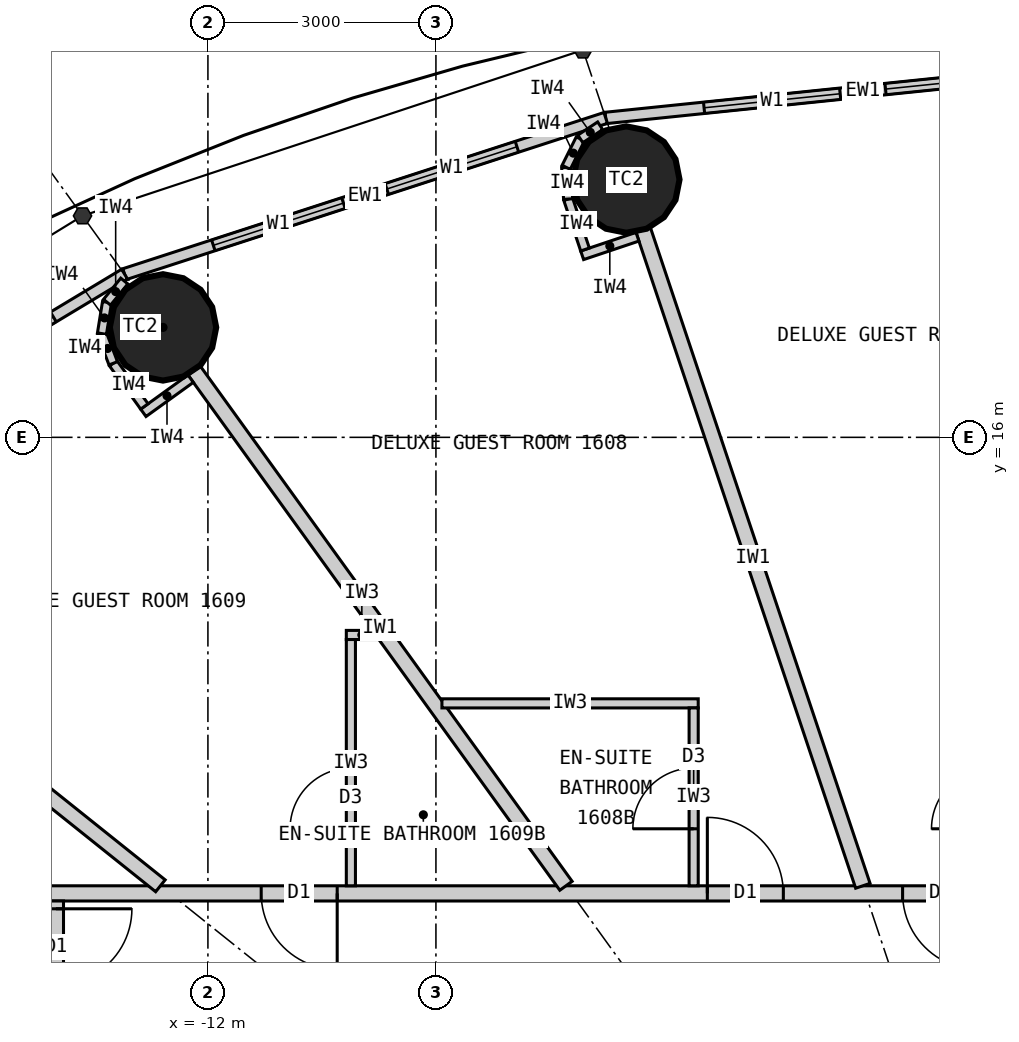
"""IFC4 building model, lengths in metres.
Left out: names, types, materials, properties, quantities, classifications, styles, units other than length and angle.
Written with IfcOpenShell. Run it as: python <this file> out.ifc"""

import sys

from ifc_helpers import new_model, si_unit, direction, frame, frame_2d, origin, origin_2d, place, context, subcontext, project, spatial, rectangle, circle, extrude, element, fill, save


model = new_model("IFC4")
c1 = context("Model", 3, precision=1e-05, world=origin(), true_north=direction((0.0, 1.0)))
c2 = subcontext(c1, "Body", "Model", "MODEL_VIEW")
j1 = project(units=[si_unit("LENGTHUNIT", "METRE"), si_unit("PLANEANGLEUNIT", "RADIAN")], contexts=[c1])
p1 = place(None, origin())
s1 = spatial("IfcSite", under=j1, at=p1, CompositionType="ELEMENT")
p2 = place(p1, origin())
s2 = spatial("IfcBuilding", under=s1, at=p2, CompositionType="ELEMENT")
p3 = place(p2, frame((0.0, 0.0, 67.2)))
s3 = spatial("IfcBuildingStorey", under=s2, at=p3, CompositionType="ELEMENT", Elevation=67.2)
for number, where, z_axis, x_axis in (
    (1, (-6.495, 19.391, 0.0), (0.0, 0.0, 1.0), (1.0, 0.0, 0.0)),
    (2, (-12.591, 17.447, 0.0), (0.0, 0.0, 1.0), (1.0, 0.0, 0.0)),
):
    element("IfcColumn", number, at=place(p3, frame(where, z_axis=z_axis, x_axis=x_axis)), inside=s3, PredefinedType="COLUMN", context=c2, shape_type="SweptSolid", body=[
        extrude(circle(Radius=0.7, at=origin_2d()), origin(), (0.0, 0.0, 1.0), 3.3),
    ])
p4 = place(p3, frame((0.0, 20.9, 0.0), z_axis=(0.0, 0.0, 1.0), x_axis=(-0.994721394369, -0.102612609291, 0.0)))
e3 = element("IfcWall", 3, at=p4, inside=s3, PredefinedType="ELEMENTEDWALL", context=c2, shape_type="SweptSolid", body=[
    extrude(rectangle(XDim=6.802, YDim=0.15, at=frame_2d((3.401, 0.0))), origin(), (0.0, 0.0, 1.0), 3.12),
])
p5 = place(p4, frame((1.301, 0.0, 0.9)))
e4 = element("IfcOpeningElement", 4, at=p5, cuts=e3, PredefinedType="OPENING", context=c2, shape_type="SweptSolid", body=[
    extrude(rectangle(XDim=1.8, YDim=1.9, at=frame_2d((0.9, 0.95))), frame((0.0, 0.085, 0.0), z_axis=(0.0, -1.0, 0.0), x_axis=(1.0, 0.0, 0.0)), (0.0, 0.0, 1.0), 0.17),
])
p6 = place(p4, frame((3.701, 0.0, 0.9)))
e5 = element("IfcOpeningElement", 5, at=p6, cuts=e3, PredefinedType="OPENING", context=c2, shape_type="SweptSolid", body=[
    extrude(rectangle(XDim=1.8, YDim=1.9, at=frame_2d((0.9, 0.95))), frame((0.0, 0.085, 0.0), z_axis=(0.0, -1.0, 0.0), x_axis=(1.0, 0.0, 0.0)), (0.0, 0.0, 1.0), 0.17),
])
p7 = place(p3, frame((-6.766, 20.202, 0.0), z_axis=(0.0, 0.0, 1.0), x_axis=(-0.951137534625, -0.308767534285, 0.0)))
e6 = element("IfcWall", 6, at=p7, inside=s3, PredefinedType="ELEMENTEDWALL", context=c2, shape_type="SweptSolid", body=[
    extrude(rectangle(XDim=6.655, YDim=0.15, at=frame_2d((3.328, 0.0))), origin(), (0.0, 0.0, 1.0), 3.12),
])
p8 = place(p7, frame((1.228, 0.0, 0.9)))
e7 = element("IfcOpeningElement", 7, at=p8, cuts=e6, PredefinedType="OPENING", context=c2, shape_type="SweptSolid", body=[
    extrude(rectangle(XDim=1.8, YDim=1.9, at=frame_2d((0.9, 0.95))), frame((0.0, 0.085, 0.0), z_axis=(0.0, -1.0, 0.0), x_axis=(1.0, 0.0, 0.0)), (0.0, 0.0, 1.0), 0.17),
])
p9 = place(p7, frame((3.628, 0.0, 0.9)))
e8 = element("IfcOpeningElement", 8, at=p9, cuts=e6, PredefinedType="OPENING", context=c2, shape_type="SweptSolid", body=[
    extrude(rectangle(XDim=1.8, YDim=1.9, at=frame_2d((0.9, 0.95))), frame((0.0, 0.085, 0.0), z_axis=(0.0, -1.0, 0.0), x_axis=(1.0, 0.0, 0.0)), (0.0, 0.0, 1.0), 0.17),
])
p10 = place(p3, frame((-13.096, 18.147, 0.0), z_axis=(0.0, 0.0, 1.0), x_axis=(-0.856983180864, -0.515344377787, 0.0)))
e9 = element("IfcWall", 9, at=p10, inside=s3, PredefinedType="ELEMENTEDWALL", context=c2, shape_type="SweptSolid", body=[
    extrude(rectangle(XDim=6.386, YDim=0.15, at=frame_2d((3.193, 0.0))), origin(), (0.0, 0.0, 1.0), 3.12),
])
p11 = place(p10, frame((1.093, 0.0, 0.9)))
e10 = element("IfcOpeningElement", 10, at=p11, cuts=e9, PredefinedType="OPENING", context=c2, shape_type="SweptSolid", body=[
    extrude(rectangle(XDim=1.8, YDim=1.9, at=frame_2d((0.9, 0.95))), frame((0.0, 0.085, 0.0), z_axis=(0.0, -1.0, 0.0), x_axis=(1.0, 0.0, 0.0)), (0.0, 0.0, 1.0), 0.17),
])
p12 = place(p10, frame((3.493, 0.0, 0.9)))
e11 = element("IfcOpeningElement", 11, at=p12, cuts=e9, PredefinedType="OPENING", context=c2, shape_type="SweptSolid", body=[
    extrude(rectangle(XDim=1.8, YDim=1.9, at=frame_2d((0.9, 0.95))), frame((0.0, 0.085, 0.0), z_axis=(0.0, -1.0, 0.0), x_axis=(1.0, 0.0, 0.0)), (0.0, 0.0, 1.0), 0.17),
])
p13 = place(p3, frame((-14.1, 10.0, 0.0), z_axis=(0.0, 0.0, 1.0), x_axis=(1.0, 0.0, 0.0)))
e12 = element("IfcWall", 12, at=p13, inside=s3, PredefinedType="PARTITIONING", context=c2, shape_type="SweptSolid", body=[
    extrude(rectangle(XDim=28.2, YDim=0.2, at=frame_2d((14.1, 0.0))), origin(), (0.0, 0.0, 1.0), 3.12),
])
p14 = place(p13, frame((18.529, 0.0, 0.0)))
e13 = element("IfcOpeningElement", 13, at=p14, cuts=e12, PredefinedType="OPENING", context=c2, shape_type="SweptSolid", body=[
    extrude(rectangle(XDim=1.0, YDim=2.2, at=frame_2d((0.5, 1.1))), frame((0.0, 0.11, 0.0), z_axis=(0.0, -1.0, 0.0), x_axis=(1.0, 0.0, 0.0)), (0.0, 0.0, 1.0), 0.22),
])
p15 = place(p13, frame((14.623, 0.0, 0.0)))
e14 = element("IfcOpeningElement", 14, at=p15, cuts=e12, PredefinedType="OPENING", context=c2, shape_type="SweptSolid", body=[
    extrude(rectangle(XDim=1.0, YDim=2.2, at=frame_2d((0.5, 1.1))), frame((0.0, 0.11, 0.0), z_axis=(0.0, -1.0, 0.0), x_axis=(1.0, 0.0, 0.0)), (0.0, 0.0, 1.0), 0.22),
])
p16 = place(p13, frame((11.24, 0.0, 0.0)))
e15 = element("IfcOpeningElement", 15, at=p16, cuts=e12, PredefinedType="OPENING", context=c2, shape_type="SweptSolid", body=[
    extrude(rectangle(XDim=1.0, YDim=2.2, at=frame_2d((0.5, 1.1))), frame((0.0, 0.11, 0.0), z_axis=(0.0, -1.0, 0.0), x_axis=(1.0, 0.0, 0.0)), (0.0, 0.0, 1.0), 0.22),
])
p17 = place(p13, frame((8.671, 0.0, 0.0)))
e16 = element("IfcOpeningElement", 16, at=p17, cuts=e12, PredefinedType="OPENING", context=c2, shape_type="SweptSolid", body=[
    extrude(rectangle(XDim=1.0, YDim=2.2, at=frame_2d((0.5, 1.1))), frame((0.0, 0.11, 0.0), z_axis=(0.0, -1.0, 0.0), x_axis=(1.0, 0.0, 0.0)), (0.0, 0.0, 1.0), 0.22),
])
p18 = place(p13, frame((2.801, 0.0, 0.0)))
e17 = element("IfcOpeningElement", 17, at=p18, cuts=e12, PredefinedType="OPENING", context=c2, shape_type="SweptSolid", body=[
    extrude(rectangle(XDim=1.0, YDim=2.2, at=frame_2d((0.5, 1.1))), frame((0.0, 0.11, 0.0), z_axis=(0.0, -1.0, 0.0), x_axis=(1.0, 0.0, 0.0)), (0.0, 0.0, 1.0), 0.22),
])
p19 = place(p3, frame((-14.0, 9.9, 0.0), z_axis=(0.0, 0.0, 1.0), x_axis=(0.0, -1.0, 0.0)))
e18 = element("IfcWall", 18, at=p19, inside=s3, PredefinedType="PARTITIONING", context=c2, shape_type="SweptSolid", body=[
    extrude(rectangle(XDim=19.8, YDim=0.2, at=frame_2d((9.9, 0.0))), origin(), (0.0, 0.0, 1.0), 3.12),
])
p20 = place(p19, frame((0.103, 0.0, 0.0)))
e19 = element("IfcOpeningElement", 19, at=p20, cuts=e18, PredefinedType="OPENING", context=c2, shape_type="SweptSolid", body=[
    extrude(rectangle(XDim=1.0, YDim=2.2, at=frame_2d((0.5, 1.1))), frame((0.0, 0.11, 0.0), z_axis=(0.0, -1.0, 0.0), x_axis=(1.0, 0.0, 0.0)), (0.0, 0.0, 1.0), 0.22),
])
p21 = place(p19, frame((5.248, 0.0, 0.0)))
e20 = element("IfcOpeningElement", 20, at=p21, cuts=e18, PredefinedType="OPENING", context=c2, shape_type="SweptSolid", body=[
    extrude(rectangle(XDim=1.0, YDim=2.2, at=frame_2d((0.5, 1.1))), frame((0.0, 0.11, 0.0), z_axis=(0.0, -1.0, 0.0), x_axis=(1.0, 0.0, 0.0)), (0.0, 0.0, 1.0), 0.22),
])
p22 = place(p19, frame((9.438, 0.0, 0.0)))
e21 = element("IfcOpeningElement", 21, at=p22, cuts=e18, PredefinedType="OPENING", context=c2, shape_type="SweptSolid", body=[
    extrude(rectangle(XDim=1.0, YDim=2.2, at=frame_2d((0.5, 1.1))), frame((0.0, 0.11, 0.0), z_axis=(0.0, -1.0, 0.0), x_axis=(1.0, 0.0, 0.0)), (0.0, 0.0, 1.0), 0.22),
])
p23 = place(p19, frame((13.942, 0.0, 0.0)))
e22 = element("IfcOpeningElement", 22, at=p23, cuts=e18, PredefinedType="OPENING", context=c2, shape_type="SweptSolid", body=[
    extrude(rectangle(XDim=1.0, YDim=2.2, at=frame_2d((0.5, 1.1))), frame((0.0, 0.11, 0.0), z_axis=(0.0, -1.0, 0.0), x_axis=(1.0, 0.0, 0.0)), (0.0, 0.0, 1.0), 0.22),
])
p24 = place(p19, frame((18.698, 0.0, 0.0)))
e23 = element("IfcOpeningElement", 23, at=p24, cuts=e18, PredefinedType="OPENING", context=c2, shape_type="SweptSolid", body=[
    extrude(rectangle(XDim=1.0, YDim=2.2, at=frame_2d((0.5, 1.1))), frame((0.0, 0.11, 0.0), z_axis=(0.0, -1.0, 0.0), x_axis=(1.0, 0.0, 0.0)), (0.0, 0.0, 1.0), 0.22),
])
p25 = place(p3, frame((-3.383, 10.1, 0.0), z_axis=(0.0, 0.0, 1.0), x_axis=(-0.31759592231, 0.948226149256, 0.0)))
e24 = element("IfcWall", 24, at=p25, inside=s3, PredefinedType="PARTITIONING", context=c2, shape_type="SweptSolid", body=[
    extrude(rectangle(XDim=9.098, YDim=0.2, at=frame_2d((4.549, 0.0))), origin(), (0.0, 0.0, 1.0), 2.32),
])
p26 = place(p3, frame((-7.289, 10.1, 0.0), z_axis=(0.0, 0.0, 1.0), x_axis=(-0.585198353053, 0.810890182197, 0.0)))
e25 = element("IfcWall", 25, at=p26, inside=s3, PredefinedType="PARTITIONING", context=c2, shape_type="SweptSolid", body=[
    extrude(rectangle(XDim=8.36, YDim=0.2, at=frame_2d((4.18, 0.0))), origin(), (0.0, 0.0, 1.0), 2.32),
])
p27 = place(p3, frame((-12.625, 10.1, 0.0), z_axis=(0.0, 0.0, 1.0), x_axis=(-0.780892451574, 0.624665493744, 0.0)))
e26 = element("IfcWall", 26, at=p27, inside=s3, PredefinedType="PARTITIONING", context=c2, shape_type="SweptSolid", body=[
    extrude(rectangle(XDim=6.045, YDim=0.2, at=frame_2d((3.022, 0.0))), origin(), (0.0, 0.0, 1.0), 2.32),
])
p28 = place(p3, frame((-8.921, 12.5, 0.0), z_axis=(0.0, 0.0, 1.0), x_axis=(1.0, 0.0, 0.0)))
e27 = element("IfcWall", 27, at=p28, inside=s3, PredefinedType="PARTITIONING", context=c2, shape_type="SweptSolid", body=[
    extrude(rectangle(XDim=3.372, YDim=0.12, at=frame_2d((1.686, 0.0))), origin(), (0.0, 0.0, 1.0), 3.12),
])
p29 = place(p3, frame((-5.609, 10.1, 0.0), z_axis=(0.0, 0.0, 1.0), x_axis=(0.0, 1.0, 0.0)))
e28 = element("IfcWall", 28, at=p29, inside=s3, PredefinedType="PARTITIONING", context=c2, shape_type="SweptSolid", body=[
    extrude(rectangle(XDim=2.34, YDim=0.12, at=frame_2d((1.17, 0.0))), origin(), (0.0, 0.0, 1.0), 3.12),
])
p30 = place(p29, frame((0.75, 0.0, 0.0)))
e29 = element("IfcOpeningElement", 29, at=p30, cuts=e28, PredefinedType="OPENING", context=c2, shape_type="SweptSolid", body=[
    extrude(rectangle(XDim=0.8, YDim=2.1, at=frame_2d((0.4, 1.05))), frame((0.0, 0.07, 0.0), z_axis=(0.0, -1.0, 0.0), x_axis=(1.0, 0.0, 0.0)), (0.0, 0.0, 1.0), 0.14),
])
p31 = place(p3, frame((-9.771, 13.4, 0.0), z_axis=(0.0, 0.0, 1.0), x_axis=(-1.0, 0.0, 0.0)))
e30 = element("IfcWall", 30, at=p31, inside=s3, PredefinedType="PARTITIONING", context=c2, shape_type="SweptSolid", body=[
    extrude(rectangle(XDim=0.408, YDim=0.12, at=frame_2d((0.204, 0.0))), origin(), (0.0, 0.0, 1.0), 3.12),
])
p32 = place(p3, frame((-10.119, 10.1, 0.0), z_axis=(0.0, 0.0, 1.0), x_axis=(0.0, 1.0, 0.0)))
e31 = element("IfcWall", 31, at=p32, inside=s3, PredefinedType="PARTITIONING", context=c2, shape_type="SweptSolid", body=[
    extrude(rectangle(XDim=3.24, YDim=0.12, at=frame_2d((1.62, 0.0))), origin(), (0.0, 0.0, 1.0), 3.12),
])
p33 = place(p32, frame((0.75, 0.0, 0.0)))
e32 = element("IfcOpeningElement", 32, at=p33, cuts=e31, PredefinedType="OPENING", context=c2, shape_type="SweptSolid", body=[
    extrude(rectangle(XDim=0.8, YDim=2.1, at=frame_2d((0.4, 1.05))), frame((0.0, 0.07, 0.0), z_axis=(0.0, -1.0, 0.0), x_axis=(1.0, 0.0, 0.0)), (0.0, 0.0, 1.0), 0.14),
])
p34 = place(p3, frame((-6.348, 18.639, 0.0), z_axis=(0.0, 0.0, 1.0), x_axis=(-0.948268951266, -0.317468102437, 0.0)))
e33 = element("IfcWall", 33, at=p34, inside=s3, PredefinedType="PARTITIONING", context=c2, shape_type="SweptSolid", body=[
    extrude(rectangle(XDim=0.768, YDim=0.12, at=frame_2d((0.384, 0.0))), origin(), (0.0, 0.0, 1.0), 3.12),
])
p35 = place(p3, frame((-7.038, 18.471, 0.0), z_axis=(0.0, 0.0, 1.0), x_axis=(-0.317378466199, 0.9482989556, 0.0)))
e34 = element("IfcWall", 34, at=p35, inside=s3, PredefinedType="PARTITIONING", context=c2, shape_type="SweptSolid", body=[
    extrude(rectangle(XDim=0.7, YDim=0.12, at=frame_2d((0.35, 0.0))), origin(), (0.0, 0.0, 1.0), 3.12),
])
p36 = place(p3, frame((-7.26, 19.135, 0.0), z_axis=(0.0, 0.0, 1.0), x_axis=(-0.0613238046, 0.99811792439, 0.0)))
e35 = element("IfcWall", 35, at=p36, inside=s3, PredefinedType="PARTITIONING", context=c2, shape_type="SweptSolid", body=[
    extrude(rectangle(XDim=0.418, YDim=0.12, at=frame_2d((0.209, 0.0))), origin(), (0.0, 0.0, 1.0), 3.12),
])
p37 = place(p3, frame((-7.286, 19.552, 0.0), z_axis=(0.0, 0.0, 1.0), x_axis=(0.445810757773, 0.89512723579, 0.0)))
e36 = element("IfcWall", 36, at=p37, inside=s3, PredefinedType="PARTITIONING", context=c2, shape_type="SweptSolid", body=[
    extrude(rectangle(XDim=0.418, YDim=0.12, at=frame_2d((0.209, 0.0))), origin(), (0.0, 0.0, 1.0), 3.12),
])
p38 = place(p3, frame((-7.1, 19.926, 0.0), z_axis=(0.0, 0.0, 1.0), x_axis=(0.833488262509, 0.552537162787, 0.0)))
e37 = element("IfcWall", 37, at=p38, inside=s3, PredefinedType="PARTITIONING", context=c2, shape_type="SweptSolid", body=[
    extrude(rectangle(XDim=0.313, YDim=0.12, at=frame_2d((0.156, 0.0))), origin(), (0.0, 0.0, 1.0), 3.12),
])
p39 = place(p3, frame((-12.227, 16.772, 0.0), z_axis=(0.0, 0.0, 1.0), x_axis=(-0.810821798253, -0.585293098778, 0.0)))
e38 = element("IfcWall", 38, at=p39, inside=s3, PredefinedType="PARTITIONING", context=c2, shape_type="SweptSolid", body=[
    extrude(rectangle(XDim=0.768, YDim=0.12, at=frame_2d((0.384, 0.0))), origin(), (0.0, 0.0, 1.0), 3.12),
])
p40 = place(p3, frame((-12.836, 16.406, 0.0), z_axis=(0.0, 0.0, 1.0), x_axis=(-0.585223113993, 0.810872312296, 0.0)))
e39 = element("IfcWall", 39, at=p40, inside=s3, PredefinedType="PARTITIONING", context=c2, shape_type="SweptSolid", body=[
    extrude(rectangle(XDim=0.7, YDim=0.12, at=frame_2d((0.35, 0.0))), origin(), (0.0, 0.0, 1.0), 3.12),
])
p41 = place(p3, frame((-13.246, 16.974, 0.0), z_axis=(0.0, 0.0, 1.0), x_axis=(-0.355728122235, 0.934589483705, 0.0)))
e40 = element("IfcWall", 40, at=p41, inside=s3, PredefinedType="PARTITIONING", context=c2, shape_type="SweptSolid", body=[
    extrude(rectangle(XDim=0.418, YDim=0.12, at=frame_2d((0.209, 0.0))), origin(), (0.0, 0.0, 1.0), 3.12),
])
p42 = place(p3, frame((-13.394, 17.365, 0.0), z_axis=(0.0, 0.0, 1.0), x_axis=(0.159379276926, 0.987217425943, 0.0)))
e41 = element("IfcWall", 41, at=p42, inside=s3, PredefinedType="PARTITIONING", context=c2, shape_type="SweptSolid", body=[
    extrude(rectangle(XDim=0.418, YDim=0.12, at=frame_2d((0.209, 0.0))), origin(), (0.0, 0.0, 1.0), 3.12),
])
p43 = place(p3, frame((-13.328, 17.777, 0.0), z_axis=(0.0, 0.0, 1.0), x_axis=(0.632276783541, 0.774742582407, 0.0)))
e42 = element("IfcWall", 42, at=p43, inside=s3, PredefinedType="PARTITIONING", context=c2, shape_type="SweptSolid", body=[
    extrude(rectangle(XDim=0.36, YDim=0.12, at=frame_2d((0.18, 0.0))), origin(), (0.0, 0.0, 1.0), 3.12),
])
p44 = place(p5, origin())
e43 = element("IfcWindow", 43, at=p44, inside=s3, PartitioningType="SINGLE_PANEL", PredefinedType="WINDOW", context=c2, shape_type="SweptSolid", body=[
    extrude(rectangle(XDim=1.8, YDim=1.9, at=frame_2d((0.9, 0.95))), frame((0.0, 0.03, 0.0), z_axis=(0.0, -1.0, 0.0), x_axis=(1.0, 0.0, 0.0)), (0.0, 0.0, 1.0), 0.06),
])
fill(e4, e43)
p45 = place(p6, origin())
e44 = element("IfcWindow", 44, at=p45, inside=s3, PartitioningType="SINGLE_PANEL", PredefinedType="WINDOW", context=c2, shape_type="SweptSolid", body=[
    extrude(rectangle(XDim=1.8, YDim=1.9, at=frame_2d((0.9, 0.95))), frame((0.0, 0.03, 0.0), z_axis=(0.0, -1.0, 0.0), x_axis=(1.0, 0.0, 0.0)), (0.0, 0.0, 1.0), 0.06),
])
fill(e5, e44)
p46 = place(p8, origin())
e45 = element("IfcWindow", 45, at=p46, inside=s3, PartitioningType="SINGLE_PANEL", PredefinedType="WINDOW", context=c2, shape_type="SweptSolid", body=[
    extrude(rectangle(XDim=1.8, YDim=1.9, at=frame_2d((0.9, 0.95))), frame((0.0, 0.03, 0.0), z_axis=(0.0, -1.0, 0.0), x_axis=(1.0, 0.0, 0.0)), (0.0, 0.0, 1.0), 0.06),
])
fill(e7, e45)
p47 = place(p9, origin())
e46 = element("IfcWindow", 46, at=p47, inside=s3, PartitioningType="SINGLE_PANEL", PredefinedType="WINDOW", context=c2, shape_type="SweptSolid", body=[
    extrude(rectangle(XDim=1.8, YDim=1.9, at=frame_2d((0.9, 0.95))), frame((0.0, 0.03, 0.0), z_axis=(0.0, -1.0, 0.0), x_axis=(1.0, 0.0, 0.0)), (0.0, 0.0, 1.0), 0.06),
])
fill(e8, e46)
p48 = place(p11, origin())
e47 = element("IfcWindow", 47, at=p48, inside=s3, PartitioningType="SINGLE_PANEL", PredefinedType="WINDOW", context=c2, shape_type="SweptSolid", body=[
    extrude(rectangle(XDim=1.8, YDim=1.9, at=frame_2d((0.9, 0.95))), frame((0.0, 0.03, 0.0), z_axis=(0.0, -1.0, 0.0), x_axis=(1.0, 0.0, 0.0)), (0.0, 0.0, 1.0), 0.06),
])
fill(e10, e47)
p49 = place(p16, origin())
e48 = element("IfcDoor", 48, at=p49, inside=s3, OperationType="SINGLE_SWING_RIGHT", PredefinedType="DOOR", context=c2, shape_type="SweptSolid", body=[
    extrude(rectangle(XDim=1.0, YDim=2.2, at=frame_2d((0.5, 1.1))), frame((0.0, 0.025, 0.0), z_axis=(0.0, -1.0, 0.0), x_axis=(1.0, 0.0, 0.0)), (0.0, 0.0, 1.0), 0.05),
])
fill(e15, e48)
p50 = place(p30, origin())
e49 = element("IfcDoor", 49, at=p50, inside=s3, OperationType="SINGLE_SWING_LEFT", PredefinedType="DOOR", context=c2, shape_type="SweptSolid", body=[
    extrude(rectangle(XDim=0.8, YDim=2.1, at=frame_2d((0.4, 1.05))), frame((0.0, 0.025, 0.0), z_axis=(0.0, -1.0, 0.0), x_axis=(1.0, 0.0, 0.0)), (0.0, 0.0, 1.0), 0.05),
])
fill(e29, e49)
p51 = place(p17, origin())
e50 = element("IfcDoor", 50, at=p51, inside=s3, OperationType="SINGLE_SWING_LEFT", PredefinedType="DOOR", context=c2, shape_type="SweptSolid", body=[
    extrude(rectangle(XDim=1.0, YDim=2.2, at=frame_2d((0.5, 1.1))), frame((0.0, 0.025, 0.0), z_axis=(0.0, -1.0, 0.0), x_axis=(1.0, 0.0, 0.0)), (0.0, 0.0, 1.0), 0.05),
])
fill(e16, e50)
p52 = place(p33, origin())
e51 = element("IfcDoor", 51, at=p52, inside=s3, OperationType="SINGLE_SWING_LEFT", PredefinedType="DOOR", context=c2, shape_type="SweptSolid", body=[
    extrude(rectangle(XDim=0.8, YDim=2.1, at=frame_2d((0.4, 1.05))), frame((0.0, 0.025, 0.0), z_axis=(0.0, -1.0, 0.0), x_axis=(1.0, 0.0, 0.0)), (0.0, 0.0, 1.0), 0.05),
])
fill(e32, e51)
p53 = place(p18, origin())
e52 = element("IfcDoor", 52, at=p53, inside=s3, OperationType="SINGLE_SWING_RIGHT", PredefinedType="DOOR", context=c2, shape_type="SweptSolid", body=[
    extrude(rectangle(XDim=1.0, YDim=2.2, at=frame_2d((0.5, 1.1))), frame((0.0, 0.025, 0.0), z_axis=(0.0, -1.0, 0.0), x_axis=(1.0, 0.0, 0.0)), (0.0, 0.0, 1.0), 0.05),
])
fill(e17, e52)
p54 = place(p20, origin())
e53 = element("IfcDoor", 53, at=p54, inside=s3, OperationType="SINGLE_SWING_LEFT", PredefinedType="DOOR", context=c2, shape_type="SweptSolid", body=[
    extrude(rectangle(XDim=1.0, YDim=2.2, at=frame_2d((0.5, 1.1))), frame((0.0, 0.025, 0.0), z_axis=(0.0, -1.0, 0.0), x_axis=(1.0, 0.0, 0.0)), (0.0, 0.0, 1.0), 0.05),
])
fill(e19, e53)
save(model, sys.argv[1])
